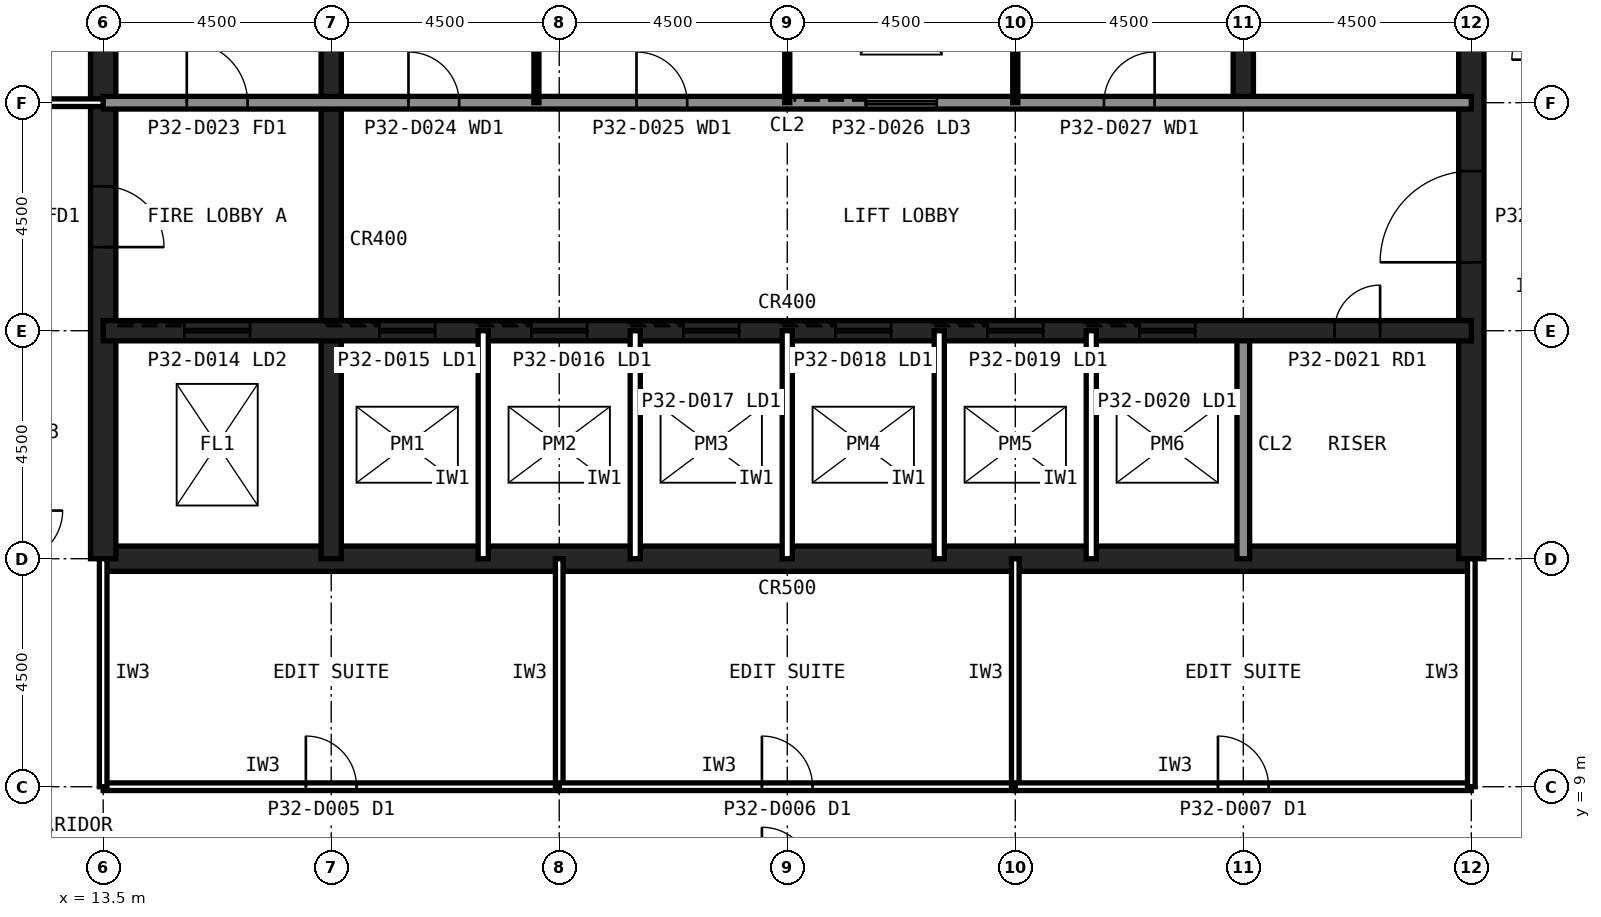
"""IFC4 building model, lengths in metres.
Left out: names, types, materials, properties, quantities, classifications, styles, units other than length and angle.
Written with IfcOpenShell. Run it as: python <this file> out.ifc"""

import sys

from ifc_helpers import new_model, si_unit, direction, frame, frame_2d, origin, place, context, subcontext, project, spatial, rectangle, extrude, element, fill, save


model = new_model("IFC4")
c1 = context("Model", 3, precision=1e-05, world=origin(), true_north=direction((0.0, 1.0)))
c2 = subcontext(c1, "Body", "Model", "MODEL_VIEW")
j1 = project(units=[si_unit("LENGTHUNIT", "METRE"), si_unit("PLANEANGLEUNIT", "RADIAN")], contexts=[c1])
p1 = place(None, origin())
s1 = spatial("IfcSite", under=j1, at=p1, CompositionType="ELEMENT")
p2 = place(p1, origin())
s2 = spatial("IfcBuilding", under=s1, at=p2, CompositionType="ELEMENT")
p3 = place(p2, frame((0.0, 0.0, 135.6)))
s3 = spatial("IfcBuildingStorey", under=s2, at=p3, CompositionType="ELEMENT", Elevation=135.6)
p4 = place(p3, frame((13.5, 13.5, 0.0), z_axis=(0.0, 0.0, 1.0), x_axis=(1.0, 0.0, 0.0)))
e1 = element("IfcWall", 1, at=p4, inside=s3, PredefinedType="SHEAR", context=c2, shape_type="SweptSolid", body=[
    extrude(rectangle(XDim=27.0, YDim=0.5, at=frame_2d((13.5, 0.0))), origin(), (0.0, 0.0, 1.0), 4.0),
])
p5 = place(p3, frame((40.5, 13.5, 0.0), z_axis=(0.0, 0.0, 1.0), x_axis=(0.0, 1.0, 0.0)))
e2 = element("IfcWall", 2, at=p5, inside=s3, PredefinedType="SHEAR", context=c2, shape_type="SweptSolid", body=[
    extrude(rectangle(XDim=27.0, YDim=0.5, at=frame_2d((13.5, 0.0))), origin(), (0.0, 0.0, 1.0), 4.0),
])
p6 = place(p5, frame((5.85, 0.0, 0.0)))
e3 = element("IfcOpeningElement", 3, at=p6, cuts=e2, PredefinedType="OPENING", context=c2, shape_type="SweptSolid", body=[
    extrude(rectangle(XDim=1.8, YDim=2.1, at=frame_2d((0.9, 1.05))), frame((0.0, 0.26, 0.0), z_axis=(0.0, -1.0, 0.0), x_axis=(1.0, 0.0, 0.0)), (0.0, 0.0, 1.0), 0.52),
])
p7 = place(p5, frame((19.65, 0.0, 0.0)))
e4 = element("IfcOpeningElement", 4, at=p7, cuts=e2, PredefinedType="OPENING", context=c2, shape_type="SweptSolid", body=[
    extrude(rectangle(XDim=1.2, YDim=2.1, at=frame_2d((0.6, 1.05))), frame((0.0, 0.26, 0.0), z_axis=(0.0, -1.0, 0.0), x_axis=(1.0, 0.0, 0.0)), (0.0, 0.0, 1.0), 0.52),
])
p8 = place(p3, frame((13.5, 40.5, 0.0), z_axis=(0.0, 0.0, 1.0), x_axis=(0.0, -1.0, 0.0)))
e5 = element("IfcWall", 5, at=p8, inside=s3, PredefinedType="SHEAR", context=c2, shape_type="SweptSolid", body=[
    extrude(rectangle(XDim=27.0, YDim=0.5, at=frame_2d((13.5, 0.0))), origin(), (0.0, 0.0, 1.0), 4.0),
])
p9 = place(p8, frame((19.65, 0.0, 0.0)))
e6 = element("IfcOpeningElement", 6, at=p9, cuts=e5, PredefinedType="OPENING", context=c2, shape_type="SweptSolid", body=[
    extrude(rectangle(XDim=1.2, YDim=2.1, at=frame_2d((0.6, 1.05))), frame((0.0, 0.26, 0.0), z_axis=(0.0, -1.0, 0.0), x_axis=(1.0, 0.0, 0.0)), (0.0, 0.0, 1.0), 0.52),
])
p10 = place(p8, frame((5.85, 0.0, 0.0)))
e7 = element("IfcOpeningElement", 7, at=p10, cuts=e5, PredefinedType="OPENING", context=c2, shape_type="SweptSolid", body=[
    extrude(rectangle(XDim=1.8, YDim=2.1, at=frame_2d((0.9, 1.05))), frame((0.0, 0.26, 0.0), z_axis=(0.0, -1.0, 0.0), x_axis=(1.0, 0.0, 0.0)), (0.0, 0.0, 1.0), 0.52),
])
p11 = place(p3, frame((18.0, 13.5, 0.0), z_axis=(0.0, 0.0, 1.0), x_axis=(0.0, 1.0, 0.0)))
e8 = element("IfcWall", 8, at=p11, inside=s3, PredefinedType="SHEAR", context=c2, shape_type="SweptSolid", body=[
    extrude(rectangle(XDim=18.0, YDim=0.4, at=frame_2d((9.0, 0.0))), origin(), (0.0, 0.0, 1.0), 4.0),
])
p12 = place(p3, frame((36.0, 13.5, 0.0), z_axis=(0.0, 0.0, 1.0), x_axis=(0.0, 1.0, 0.0)))
e9 = element("IfcWall", 9, at=p12, inside=s3, PredefinedType="SOLIDWALL", context=c2, shape_type="SweptSolid", body=[
    extrude(rectangle(XDim=4.5, YDim=0.25, at=frame_2d((2.25, 0.0))), origin(), (0.0, 0.0, 1.0), 3.84),
])
p13 = place(p3, frame((36.0, 22.5, 0.0), z_axis=(0.0, 0.0, 1.0), x_axis=(0.0, 1.0, 0.0)))
e10 = element("IfcWall", 10, at=p13, inside=s3, PredefinedType="SHEAR", context=c2, shape_type="SweptSolid", body=[
    extrude(rectangle(XDim=18.0, YDim=0.4, at=frame_2d((9.0, 0.0))), origin(), (0.0, 0.0, 1.0), 4.0),
])
p14 = place(p3, frame((13.5, 18.0, 0.0), z_axis=(0.0, 0.0, 1.0), x_axis=(1.0, 0.0, 0.0)))
e11 = element("IfcWall", 11, at=p14, inside=s3, PredefinedType="SHEAR", context=c2, shape_type="SweptSolid", body=[
    extrude(rectangle(XDim=27.0, YDim=0.4, at=frame_2d((13.5, 0.0))), origin(), (0.0, 0.0, 1.0), 4.0),
])
p15 = place(p14, frame((24.3, 0.0, 0.0)))
e12 = element("IfcOpeningElement", 12, at=p15, cuts=e11, PredefinedType="OPENING", context=c2, shape_type="SweptSolid", body=[
    extrude(rectangle(XDim=0.9, YDim=2.1, at=frame_2d((0.45, 1.05))), frame((0.0, 0.21, 0.0), z_axis=(0.0, -1.0, 0.0), x_axis=(1.0, 0.0, 0.0)), (0.0, 0.0, 1.0), 0.42),
])
p16 = place(p14, frame((5.45, 0.0, 0.0)))
e13 = element("IfcOpeningElement", 13, at=p16, cuts=e11, PredefinedType="OPENING", context=c2, shape_type="SweptSolid", body=[
    extrude(rectangle(XDim=1.1, YDim=2.1, at=frame_2d((0.55, 1.05))), frame((0.0, 0.21, 0.0), z_axis=(0.0, -1.0, 0.0), x_axis=(1.0, 0.0, 0.0)), (0.0, 0.0, 1.0), 0.42),
])
p17 = place(p14, frame((8.45, 0.0, 0.0)))
e14 = element("IfcOpeningElement", 14, at=p17, cuts=e11, PredefinedType="OPENING", context=c2, shape_type="SweptSolid", body=[
    extrude(rectangle(XDim=1.1, YDim=2.1, at=frame_2d((0.55, 1.05))), frame((0.0, 0.21, 0.0), z_axis=(0.0, -1.0, 0.0), x_axis=(1.0, 0.0, 0.0)), (0.0, 0.0, 1.0), 0.42),
])
p18 = place(p14, frame((11.45, 0.0, 0.0)))
e15 = element("IfcOpeningElement", 15, at=p18, cuts=e11, PredefinedType="OPENING", context=c2, shape_type="SweptSolid", body=[
    extrude(rectangle(XDim=1.1, YDim=2.1, at=frame_2d((0.55, 1.05))), frame((0.0, 0.21, 0.0), z_axis=(0.0, -1.0, 0.0), x_axis=(1.0, 0.0, 0.0)), (0.0, 0.0, 1.0), 0.42),
])
p19 = place(p14, frame((14.45, 0.0, 0.0)))
e16 = element("IfcOpeningElement", 16, at=p19, cuts=e11, PredefinedType="OPENING", context=c2, shape_type="SweptSolid", body=[
    extrude(rectangle(XDim=1.1, YDim=2.1, at=frame_2d((0.55, 1.05))), frame((0.0, 0.21, 0.0), z_axis=(0.0, -1.0, 0.0), x_axis=(1.0, 0.0, 0.0)), (0.0, 0.0, 1.0), 0.42),
])
p20 = place(p14, frame((17.45, 0.0, 0.0)))
e17 = element("IfcOpeningElement", 17, at=p20, cuts=e11, PredefinedType="OPENING", context=c2, shape_type="SweptSolid", body=[
    extrude(rectangle(XDim=1.1, YDim=2.1, at=frame_2d((0.55, 1.05))), frame((0.0, 0.21, 0.0), z_axis=(0.0, -1.0, 0.0), x_axis=(1.0, 0.0, 0.0)), (0.0, 0.0, 1.0), 0.42),
])
p21 = place(p14, frame((20.45, 0.0, 0.0)))
e18 = element("IfcOpeningElement", 18, at=p21, cuts=e11, PredefinedType="OPENING", context=c2, shape_type="SweptSolid", body=[
    extrude(rectangle(XDim=1.1, YDim=2.1, at=frame_2d((0.55, 1.05))), frame((0.0, 0.21, 0.0), z_axis=(0.0, -1.0, 0.0), x_axis=(1.0, 0.0, 0.0)), (0.0, 0.0, 1.0), 0.42),
])
p22 = place(p14, frame((1.6, 0.0, 0.0)))
e19 = element("IfcOpeningElement", 19, at=p22, cuts=e11, PredefinedType="OPENING", context=c2, shape_type="SweptSolid", body=[
    extrude(rectangle(XDim=1.3, YDim=2.2, at=frame_2d((0.65, 1.1))), frame((0.0, 0.21, 0.0), z_axis=(0.0, -1.0, 0.0), x_axis=(1.0, 0.0, 0.0)), (0.0, 0.0, 1.0), 0.42),
])
p23 = place(p3, frame((13.5, 22.5, 0.0), z_axis=(0.0, 0.0, 1.0), x_axis=(1.0, 0.0, 0.0)))
e20 = element("IfcWall", 20, at=p23, inside=s3, PredefinedType="SOLIDWALL", context=c2, shape_type="SweptSolid", body=[
    extrude(rectangle(XDim=27.0, YDim=0.25, at=frame_2d((13.5, 0.0))), origin(), (0.0, 0.0, 1.0), 3.84),
])
p24 = place(p23, frame((1.65, 0.0, 0.0)))
e21 = element("IfcOpeningElement", 21, at=p24, cuts=e20, PredefinedType="OPENING", context=c2, shape_type="SweptSolid", body=[
    extrude(rectangle(XDim=1.2, YDim=2.1, at=frame_2d((0.6, 1.05))), frame((0.0, 0.135, 0.0), z_axis=(0.0, -1.0, 0.0), x_axis=(1.0, 0.0, 0.0)), (0.0, 0.0, 1.0), 0.27),
])
p25 = place(p23, frame((6.025, 0.0, 0.0)))
e22 = element("IfcOpeningElement", 22, at=p25, cuts=e20, PredefinedType="OPENING", context=c2, shape_type="SweptSolid", body=[
    extrude(rectangle(XDim=1.0, YDim=2.1, at=frame_2d((0.5, 1.05))), frame((0.0, 0.135, 0.0), z_axis=(0.0, -1.0, 0.0), x_axis=(1.0, 0.0, 0.0)), (0.0, 0.0, 1.0), 0.27),
])
p26 = place(p23, frame((10.525, 0.0, 0.0)))
e23 = element("IfcOpeningElement", 23, at=p26, cuts=e20, PredefinedType="OPENING", context=c2, shape_type="SweptSolid", body=[
    extrude(rectangle(XDim=1.0, YDim=2.1, at=frame_2d((0.5, 1.05))), frame((0.0, 0.135, 0.0), z_axis=(0.0, -1.0, 0.0), x_axis=(1.0, 0.0, 0.0)), (0.0, 0.0, 1.0), 0.27),
])
p27 = place(p23, frame((19.75, 0.0, 0.0)))
e24 = element("IfcOpeningElement", 24, at=p27, cuts=e20, PredefinedType="OPENING", context=c2, shape_type="SweptSolid", body=[
    extrude(rectangle(XDim=1.0, YDim=2.1, at=frame_2d((0.5, 1.05))), frame((0.0, 0.135, 0.0), z_axis=(0.0, -1.0, 0.0), x_axis=(1.0, 0.0, 0.0)), (0.0, 0.0, 1.0), 0.27),
])
p28 = place(p23, frame((15.05, 0.0, 0.0)))
e25 = element("IfcOpeningElement", 25, at=p28, cuts=e20, PredefinedType="OPENING", context=c2, shape_type="SweptSolid", body=[
    extrude(rectangle(XDim=1.4, YDim=2.4, at=frame_2d((0.7, 1.2))), frame((0.0, 0.135, 0.0), z_axis=(0.0, -1.0, 0.0), x_axis=(1.0, 0.0, 0.0)), (0.0, 0.0, 1.0), 0.27),
])
for number, where, z_axis, x_axis in (
    (26, (21.0, 13.5, 0.0), (0.0, 0.0, 1.0), (0.0, 1.0, 0.0)),
    (27, (24.0, 13.5, 0.0), (0.0, 0.0, 1.0), (0.0, 1.0, 0.0)),
    (28, (27.0, 13.5, 0.0), (0.0, 0.0, 1.0), (0.0, 1.0, 0.0)),
    (29, (30.0, 13.5, 0.0), (0.0, 0.0, 1.0), (0.0, 1.0, 0.0)),
    (30, (33.0, 13.5, 0.0), (0.0, 0.0, 1.0), (0.0, 1.0, 0.0)),
):
    element("IfcWall", number, at=place(p3, frame(where, z_axis=z_axis, x_axis=x_axis)), inside=s3, PredefinedType="PARTITIONING", context=c2, shape_type="SweptSolid", body=[
        extrude(rectangle(XDim=4.5, YDim=0.2, at=frame_2d((2.25, 0.0))), origin(), (0.0, 0.0, 1.0), 3.84),
    ])
for number, where, z_axis, x_axis in (
    (31, (22.05, 22.5, 0.0), (0.0, 0.0, 1.0), (0.0, 1.0, 0.0)),
    (32, (27.0, 22.5, 0.0), (0.0, 0.0, 1.0), (0.0, 1.0, 0.0)),
    (33, (31.5, 22.5, 0.0), (0.0, 0.0, 1.0), (0.0, 1.0, 0.0)),
):
    element("IfcWall", number, at=place(p3, frame(where, z_axis=z_axis, x_axis=x_axis)), inside=s3, PredefinedType="PLUMBINGWALL", context=c2, shape_type="SweptSolid", body=[
        extrude(rectangle(XDim=9.0, YDim=0.1, at=frame_2d((4.5, 0.0))), origin(), (0.0, 0.0, 1.0), 3.84),
    ])
p29 = place(p3, frame((13.5, 9.0, 0.0), z_axis=(0.0, 0.0, 1.0), x_axis=(1.0, 0.0, 0.0)))
e34 = element("IfcWall", 34, at=p29, inside=s3, PredefinedType="PARTITIONING", context=c2, shape_type="SweptSolid", body=[
    extrude(rectangle(XDim=9.0, YDim=0.15, at=frame_2d((4.5, 0.0))), origin(), (0.0, 0.0, 1.0), 3.84),
])
p30 = place(p29, frame((4.0, 0.0, 0.0)))
e35 = element("IfcOpeningElement", 35, at=p30, cuts=e34, PredefinedType="OPENING", context=c2, shape_type="SweptSolid", body=[
    extrude(rectangle(XDim=1.0, YDim=2.1, at=frame_2d((0.5, 1.05))), frame((0.0, 0.085, 0.0), z_axis=(0.0, -1.0, 0.0), x_axis=(1.0, 0.0, 0.0)), (0.0, 0.0, 1.0), 0.17),
])
for number, where, z_axis, x_axis in (
    (36, (22.5, 9.0, 0.0), (0.0, 0.0, 1.0), (0.0, 1.0, 0.0)),
    (37, (13.5, 13.5, 0.0), (0.0, 0.0, 1.0), (0.0, -1.0, 0.0)),
):
    element("IfcWall", number, at=place(p3, frame(where, z_axis=z_axis, x_axis=x_axis)), inside=s3, PredefinedType="PARTITIONING", context=c2, shape_type="SweptSolid", body=[
        extrude(rectangle(XDim=4.5, YDim=0.15, at=frame_2d((2.25, 0.0))), origin(), (0.0, 0.0, 1.0), 2.989),
    ])
p31 = place(p3, frame((22.5, 9.0, 0.0), z_axis=(0.0, 0.0, 1.0), x_axis=(1.0, 0.0, 0.0)))
e38 = element("IfcWall", 38, at=p31, inside=s3, PredefinedType="PARTITIONING", context=c2, shape_type="SweptSolid", body=[
    extrude(rectangle(XDim=9.0, YDim=0.15, at=frame_2d((4.5, 0.0))), origin(), (0.0, 0.0, 1.0), 3.84),
])
p32 = place(p31, frame((4.0, 0.0, 0.0)))
e39 = element("IfcOpeningElement", 39, at=p32, cuts=e38, PredefinedType="OPENING", context=c2, shape_type="SweptSolid", body=[
    extrude(rectangle(XDim=1.0, YDim=2.1, at=frame_2d((0.5, 1.05))), frame((0.0, 0.085, 0.0), z_axis=(0.0, -1.0, 0.0), x_axis=(1.0, 0.0, 0.0)), (0.0, 0.0, 1.0), 0.17),
])
p33 = place(p3, frame((31.5, 9.0, 0.0), z_axis=(0.0, 0.0, 1.0), x_axis=(0.0, 1.0, 0.0)))
e40 = element("IfcWall", 40, at=p33, inside=s3, PredefinedType="PARTITIONING", context=c2, shape_type="SweptSolid", body=[
    extrude(rectangle(XDim=4.5, YDim=0.15, at=frame_2d((2.25, 0.0))), origin(), (0.0, 0.0, 1.0), 2.989),
])
p34 = place(p3, frame((31.5, 9.0, 0.0), z_axis=(0.0, 0.0, 1.0), x_axis=(1.0, 0.0, 0.0)))
e41 = element("IfcWall", 41, at=p34, inside=s3, PredefinedType="PARTITIONING", context=c2, shape_type="SweptSolid", body=[
    extrude(rectangle(XDim=9.0, YDim=0.15, at=frame_2d((4.5, 0.0))), origin(), (0.0, 0.0, 1.0), 3.84),
])
p35 = place(p34, frame((4.0, 0.0, 0.0)))
e42 = element("IfcOpeningElement", 42, at=p35, cuts=e41, PredefinedType="OPENING", context=c2, shape_type="SweptSolid", body=[
    extrude(rectangle(XDim=1.0, YDim=2.1, at=frame_2d((0.5, 1.05))), frame((0.0, 0.085, 0.0), z_axis=(0.0, -1.0, 0.0), x_axis=(1.0, 0.0, 0.0)), (0.0, 0.0, 1.0), 0.17),
])
p36 = place(p3, frame((40.5, 9.0, 0.0), z_axis=(0.0, 0.0, 1.0), x_axis=(0.0, 1.0, 0.0)))
e43 = element("IfcWall", 43, at=p36, inside=s3, PredefinedType="PARTITIONING", context=c2, shape_type="SweptSolid", body=[
    extrude(rectangle(XDim=4.5, YDim=0.15, at=frame_2d((2.25, 0.0))), origin(), (0.0, 0.0, 1.0), 2.989),
])
p37 = place(p3, frame((10.5, 22.5, 0.0), z_axis=(0.0, 0.0, 1.0), x_axis=(1.0, 0.0, 0.0)))
e44 = element("IfcWall", 44, at=p37, inside=s3, PredefinedType="PARTITIONING", context=c2, shape_type="SweptSolid", body=[
    extrude(rectangle(XDim=3.0, YDim=0.15, at=frame_2d((1.5, 0.0))), origin(), (0.0, 0.0, 1.0), 2.989),
])
p38 = place(p9, origin())
e45 = element("IfcDoor", 45, at=p38, inside=s3, OperationType="SINGLE_SWING_RIGHT", PredefinedType="DOOR", context=c2, shape_type="SweptSolid", body=[
    extrude(rectangle(XDim=1.2, YDim=2.1, at=frame_2d((0.6, 1.05))), frame((0.0, 0.025, 0.0), z_axis=(0.0, -1.0, 0.0), x_axis=(1.0, 0.0, 0.0)), (0.0, 0.0, 1.0), 0.05),
])
fill(e6, e45)
p39 = place(p6, origin())
e46 = element("IfcDoor", 46, at=p39, inside=s3, OperationType="SINGLE_SWING_LEFT", PredefinedType="DOOR", context=c2, shape_type="SweptSolid", body=[
    extrude(rectangle(XDim=1.8, YDim=2.1, at=frame_2d((0.9, 1.05))), frame((0.0, 0.025, 0.0), z_axis=(0.0, -1.0, 0.0), x_axis=(1.0, 0.0, 0.0)), (0.0, 0.0, 1.0), 0.05),
])
fill(e3, e46)
p40 = place(p24, origin())
e47 = element("IfcDoor", 47, at=p40, inside=s3, OperationType="SINGLE_SWING_LEFT", PredefinedType="DOOR", context=c2, shape_type="SweptSolid", body=[
    extrude(rectangle(XDim=1.2, YDim=2.1, at=frame_2d((0.6, 1.05))), frame((0.0, 0.025, 0.0), z_axis=(0.0, -1.0, 0.0), x_axis=(1.0, 0.0, 0.0)), (0.0, 0.0, 1.0), 0.05),
])
fill(e21, e47)
p41 = place(p25, origin())
e48 = element("IfcDoor", 48, at=p41, inside=s3, OperationType="SINGLE_SWING_LEFT", PredefinedType="DOOR", context=c2, shape_type="SweptSolid", body=[
    extrude(rectangle(XDim=1.0, YDim=2.1, at=frame_2d((0.5, 1.05))), frame((0.0, 0.025, 0.0), z_axis=(0.0, -1.0, 0.0), x_axis=(1.0, 0.0, 0.0)), (0.0, 0.0, 1.0), 0.05),
])
fill(e22, e48)
p42 = place(p26, origin())
e49 = element("IfcDoor", 49, at=p42, inside=s3, OperationType="SINGLE_SWING_LEFT", PredefinedType="DOOR", context=c2, shape_type="SweptSolid", body=[
    extrude(rectangle(XDim=1.0, YDim=2.1, at=frame_2d((0.5, 1.05))), frame((0.0, 0.025, 0.0), z_axis=(0.0, -1.0, 0.0), x_axis=(1.0, 0.0, 0.0)), (0.0, 0.0, 1.0), 0.05),
])
fill(e23, e49)
p43 = place(p27, origin())
e50 = element("IfcDoor", 50, at=p43, inside=s3, OperationType="SINGLE_SWING_RIGHT", PredefinedType="DOOR", context=c2, shape_type="SweptSolid", body=[
    extrude(rectangle(XDim=1.0, YDim=2.1, at=frame_2d((0.5, 1.05))), frame((0.0, 0.025, 0.0), z_axis=(0.0, -1.0, 0.0), x_axis=(1.0, 0.0, 0.0)), (0.0, 0.0, 1.0), 0.05),
])
fill(e24, e50)
p44 = place(p15, origin())
e51 = element("IfcDoor", 51, at=p44, inside=s3, OperationType="SINGLE_SWING_RIGHT", PredefinedType="DOOR", context=c2, shape_type="SweptSolid", body=[
    extrude(rectangle(XDim=0.9, YDim=2.1, at=frame_2d((0.45, 1.05))), frame((0.0, 0.025, 0.0), z_axis=(0.0, -1.0, 0.0), x_axis=(1.0, 0.0, 0.0)), (0.0, 0.0, 1.0), 0.05),
])
fill(e12, e51)
p45 = place(p16, origin())
e52 = element("IfcDoor", 52, at=p45, inside=s3, OperationType="SLIDING_TO_LEFT", PredefinedType="DOOR", context=c2, shape_type="SweptSolid", body=[
    extrude(rectangle(XDim=1.1, YDim=2.1, at=frame_2d((0.55, 1.05))), frame((0.0, 0.025, 0.0), z_axis=(0.0, -1.0, 0.0), x_axis=(1.0, 0.0, 0.0)), (0.0, 0.0, 1.0), 0.05),
])
fill(e13, e52)
p46 = place(p17, origin())
e53 = element("IfcDoor", 53, at=p46, inside=s3, OperationType="SLIDING_TO_LEFT", PredefinedType="DOOR", context=c2, shape_type="SweptSolid", body=[
    extrude(rectangle(XDim=1.1, YDim=2.1, at=frame_2d((0.55, 1.05))), frame((0.0, 0.025, 0.0), z_axis=(0.0, -1.0, 0.0), x_axis=(1.0, 0.0, 0.0)), (0.0, 0.0, 1.0), 0.05),
])
fill(e14, e53)
p47 = place(p18, origin())
e54 = element("IfcDoor", 54, at=p47, inside=s3, OperationType="SLIDING_TO_LEFT", PredefinedType="DOOR", context=c2, shape_type="SweptSolid", body=[
    extrude(rectangle(XDim=1.1, YDim=2.1, at=frame_2d((0.55, 1.05))), frame((0.0, 0.025, 0.0), z_axis=(0.0, -1.0, 0.0), x_axis=(1.0, 0.0, 0.0)), (0.0, 0.0, 1.0), 0.05),
])
fill(e15, e54)
p48 = place(p19, origin())
e55 = element("IfcDoor", 55, at=p48, inside=s3, OperationType="SLIDING_TO_LEFT", PredefinedType="DOOR", context=c2, shape_type="SweptSolid", body=[
    extrude(rectangle(XDim=1.1, YDim=2.1, at=frame_2d((0.55, 1.05))), frame((0.0, 0.025, 0.0), z_axis=(0.0, -1.0, 0.0), x_axis=(1.0, 0.0, 0.0)), (0.0, 0.0, 1.0), 0.05),
])
fill(e16, e55)
p49 = place(p20, origin())
e56 = element("IfcDoor", 56, at=p49, inside=s3, OperationType="SLIDING_TO_LEFT", PredefinedType="DOOR", context=c2, shape_type="SweptSolid", body=[
    extrude(rectangle(XDim=1.1, YDim=2.1, at=frame_2d((0.55, 1.05))), frame((0.0, 0.025, 0.0), z_axis=(0.0, -1.0, 0.0), x_axis=(1.0, 0.0, 0.0)), (0.0, 0.0, 1.0), 0.05),
])
fill(e17, e56)
p50 = place(p21, origin())
e57 = element("IfcDoor", 57, at=p50, inside=s3, OperationType="SLIDING_TO_LEFT", PredefinedType="DOOR", context=c2, shape_type="SweptSolid", body=[
    extrude(rectangle(XDim=1.1, YDim=2.1, at=frame_2d((0.55, 1.05))), frame((0.0, 0.025, 0.0), z_axis=(0.0, -1.0, 0.0), x_axis=(1.0, 0.0, 0.0)), (0.0, 0.0, 1.0), 0.05),
])
fill(e18, e57)
p51 = place(p22, origin())
e58 = element("IfcDoor", 58, at=p51, inside=s3, OperationType="SLIDING_TO_LEFT", PredefinedType="DOOR", context=c2, shape_type="SweptSolid", body=[
    extrude(rectangle(XDim=1.3, YDim=2.2, at=frame_2d((0.65, 1.1))), frame((0.0, 0.025, 0.0), z_axis=(0.0, -1.0, 0.0), x_axis=(1.0, 0.0, 0.0)), (0.0, 0.0, 1.0), 0.05),
])
fill(e19, e58)
p52 = place(p28, origin())
e59 = element("IfcDoor", 59, at=p52, inside=s3, OperationType="SLIDING_TO_LEFT", PredefinedType="DOOR", context=c2, shape_type="SweptSolid", body=[
    extrude(rectangle(XDim=1.4, YDim=2.4, at=frame_2d((0.7, 1.2))), frame((0.0, 0.025, 0.0), z_axis=(0.0, -1.0, 0.0), x_axis=(1.0, 0.0, 0.0)), (0.0, 0.0, 1.0), 0.05),
])
fill(e25, e59)
p53 = place(p30, origin())
e60 = element("IfcDoor", 60, at=p53, inside=s3, OperationType="SINGLE_SWING_LEFT", PredefinedType="DOOR", context=c2, shape_type="SweptSolid", body=[
    extrude(rectangle(XDim=1.0, YDim=2.1, at=frame_2d((0.5, 1.05))), frame((0.0, 0.025, 0.0), z_axis=(0.0, -1.0, 0.0), x_axis=(1.0, 0.0, 0.0)), (0.0, 0.0, 1.0), 0.05),
])
fill(e35, e60)
p54 = place(p32, origin())
e61 = element("IfcDoor", 61, at=p54, inside=s3, OperationType="SINGLE_SWING_LEFT", PredefinedType="DOOR", context=c2, shape_type="SweptSolid", body=[
    extrude(rectangle(XDim=1.0, YDim=2.1, at=frame_2d((0.5, 1.05))), frame((0.0, 0.025, 0.0), z_axis=(0.0, -1.0, 0.0), x_axis=(1.0, 0.0, 0.0)), (0.0, 0.0, 1.0), 0.05),
])
fill(e39, e61)
p55 = place(p35, origin())
e62 = element("IfcDoor", 62, at=p55, inside=s3, OperationType="SINGLE_SWING_LEFT", PredefinedType="DOOR", context=c2, shape_type="SweptSolid", body=[
    extrude(rectangle(XDim=1.0, YDim=2.1, at=frame_2d((0.5, 1.05))), frame((0.0, 0.025, 0.0), z_axis=(0.0, -1.0, 0.0), x_axis=(1.0, 0.0, 0.0)), (0.0, 0.0, 1.0), 0.05),
])
fill(e42, e62)
save(model, sys.argv[1])
